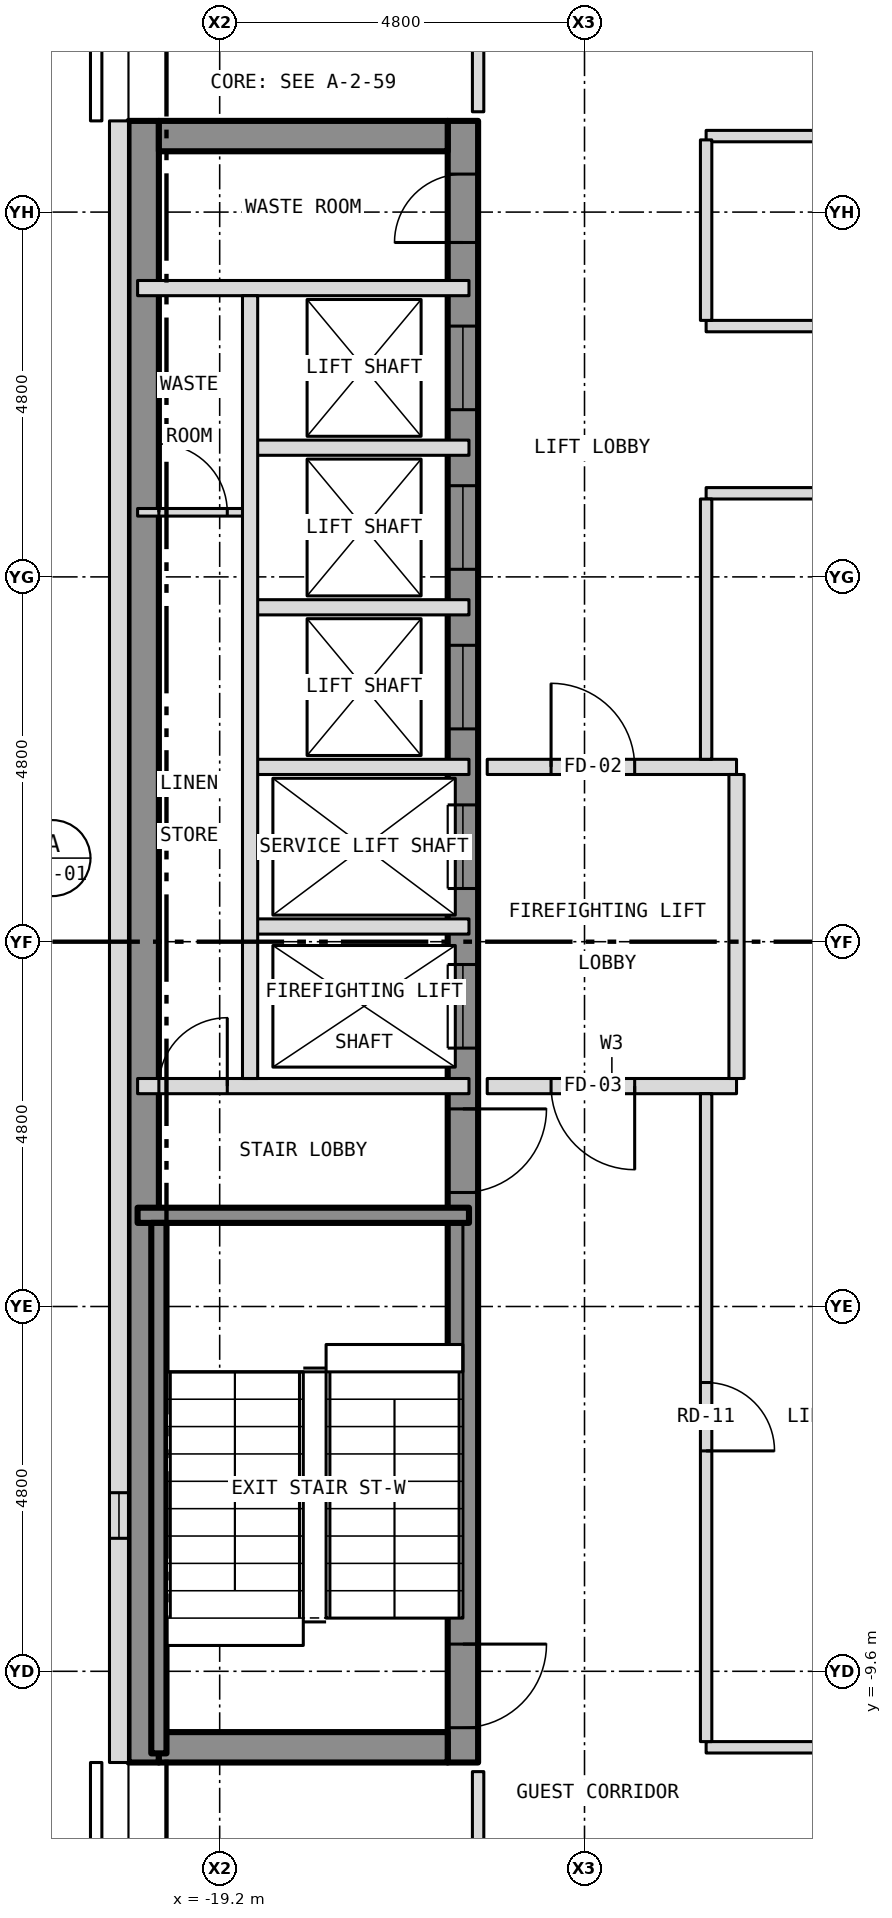
"""IFC4 building model, lengths in metres.
Left out: names, types, materials, properties, quantities, classifications, styles, units other than length and angle.
Written with IfcOpenShell. Run it as: python <this file> out.ifc"""

import sys

from ifc_helpers import new_model, si_unit, direction, frame, frame_2d, origin, place, context, subcontext, project, spatial, rectangle, extrude, element, fill, save


model = new_model("IFC4")
c1 = context("Model", 3, precision=1e-05, world=origin(), true_north=direction((0.0, 1.0)))
c2 = subcontext(c1, "Body", "Model", "MODEL_VIEW")
j1 = project(units=[si_unit("LENGTHUNIT", "METRE"), si_unit("PLANEANGLEUNIT", "RADIAN")], contexts=[c1])
p1 = place(None, origin())
s1 = spatial("IfcSite", under=j1, at=p1, CompositionType="ELEMENT")
p2 = place(p1, origin())
s2 = spatial("IfcBuilding", under=s1, at=p2, CompositionType="ELEMENT")
p3 = place(p2, frame((0.0, 0.0, 215.5)))
s3 = spatial("IfcBuildingStorey", under=s2, at=p3, CompositionType="ELEMENT", Elevation=215.5)
p4 = place(p3, frame((-16.0, -10.8, 0.0), z_axis=(0.0, 0.0, 1.0), x_axis=(0.0, 1.0, 0.0)))
e1 = element("IfcWall", 1, at=p4, inside=s3, PredefinedType="SHEAR", context=c2, shape_type="SweptSolid", body=[
    extrude(rectangle(XDim=21.6, YDim=0.4, at=frame_2d((10.8, 0.0))), origin(), (0.0, 0.0, 1.0), 3.25),
])
p5 = place(p4, frame((9.4, 0.0, 0.0)))
e2 = element("IfcOpeningElement", 2, at=p5, cuts=e1, PredefinedType="OPENING", context=c2, shape_type="SweptSolid", body=[
    extrude(rectangle(XDim=1.1, YDim=2.1, at=frame_2d((0.55, 1.05))), frame((0.0, 0.212, 0.0), z_axis=(0.0, -1.0, 0.0), x_axis=(1.0, 0.0, 0.0)), (0.0, 0.0, 1.0), 0.424),
])
p6 = place(p4, frame((11.5, 0.0, 0.0)))
e3 = element("IfcOpeningElement", 3, at=p6, cuts=e1, PredefinedType="OPENING", context=c2, shape_type="SweptSolid", body=[
    extrude(rectangle(XDim=1.1, YDim=2.1, at=frame_2d((0.55, 1.05))), frame((0.0, 0.212, 0.0), z_axis=(0.0, -1.0, 0.0), x_axis=(1.0, 0.0, 0.0)), (0.0, 0.0, 1.0), 0.424),
])
p7 = place(p4, frame((13.6, 0.0, 0.0)))
e4 = element("IfcOpeningElement", 4, at=p7, cuts=e1, PredefinedType="OPENING", context=c2, shape_type="SweptSolid", body=[
    extrude(rectangle(XDim=1.1, YDim=2.1, at=frame_2d((0.55, 1.05))), frame((0.0, 0.212, 0.0), z_axis=(0.0, -1.0, 0.0), x_axis=(1.0, 0.0, 0.0)), (0.0, 0.0, 1.0), 0.424),
])
p8 = place(p4, frame((15.7, 0.0, 0.0)))
e5 = element("IfcOpeningElement", 5, at=p8, cuts=e1, PredefinedType="OPENING", context=c2, shape_type="SweptSolid", body=[
    extrude(rectangle(XDim=1.1, YDim=2.1, at=frame_2d((0.55, 1.05))), frame((0.0, 0.212, 0.0), z_axis=(0.0, -1.0, 0.0), x_axis=(1.0, 0.0, 0.0)), (0.0, 0.0, 1.0), 0.424),
])
p9 = place(p4, frame((17.8, 0.0, 0.0)))
e6 = element("IfcOpeningElement", 6, at=p9, cuts=e1, PredefinedType="OPENING", context=c2, shape_type="SweptSolid", body=[
    extrude(rectangle(XDim=1.1, YDim=2.1, at=frame_2d((0.55, 1.05))), frame((0.0, 0.212, 0.0), z_axis=(0.0, -1.0, 0.0), x_axis=(1.0, 0.0, 0.0)), (0.0, 0.0, 1.0), 0.424),
])
p10 = place(p4, frame((0.458, 0.0, 0.0)))
e7 = element("IfcOpeningElement", 7, at=p10, cuts=e1, PredefinedType="OPENING", context=c2, shape_type="SweptSolid", body=[
    extrude(rectangle(XDim=1.1, YDim=2.1, at=frame_2d((0.55, 1.05))), frame((0.0, 0.212, 0.0), z_axis=(0.0, -1.0, 0.0), x_axis=(1.0, 0.0, 0.0)), (0.0, 0.0, 1.0), 0.424),
])
p11 = place(p4, frame((7.5, 0.0, 0.0)))
e8 = element("IfcOpeningElement", 8, at=p11, cuts=e1, PredefinedType="OPENING", context=c2, shape_type="SweptSolid", body=[
    extrude(rectangle(XDim=1.1, YDim=2.1, at=frame_2d((0.55, 1.05))), frame((0.0, 0.212, 0.0), z_axis=(0.0, -1.0, 0.0), x_axis=(1.0, 0.0, 0.0)), (0.0, 0.0, 1.0), 0.424),
])
p12 = place(p4, frame((20.0, 0.0, 0.0)))
e9 = element("IfcOpeningElement", 9, at=p12, cuts=e1, PredefinedType="OPENING", context=c2, shape_type="SweptSolid", body=[
    extrude(rectangle(XDim=0.9, YDim=2.1, at=frame_2d((0.45, 1.05))), frame((0.0, 0.212, 0.0), z_axis=(0.0, -1.0, 0.0), x_axis=(1.0, 0.0, 0.0)), (0.0, 0.0, 1.0), 0.424),
])
p13 = place(p3, frame((-20.2, -10.8, 0.0), z_axis=(0.0, 0.0, 1.0), x_axis=(0.0, 1.0, 0.0)))
e10 = element("IfcWall", 10, at=p13, inside=s3, PredefinedType="SHEAR", context=c2, shape_type="SweptSolid", body=[
    extrude(rectangle(XDim=21.6, YDim=0.4, at=frame_2d((10.8, 0.0))), origin(), (0.0, 0.0, 1.0), 3.25),
])
for number, where, z_axis, x_axis in (
    (11, (-20.0, 10.6, 0.0), (0.0, 0.0, 1.0), (1.0, 0.0, 0.0)),
    (12, (-20.0, -10.6, 0.0), (0.0, 0.0, 1.0), (1.0, 0.0, 0.0)),
):
    element("IfcWall", number, at=place(p3, frame(where, z_axis=z_axis, x_axis=x_axis)), inside=s3, PredefinedType="SHEAR", context=c2, shape_type="SweptSolid", body=[
        extrude(rectangle(XDim=3.8, YDim=0.4, at=frame_2d((1.9, 0.0))), origin(), (0.0, 0.0, 1.0), 3.25),
    ])
p14 = place(p3, frame((-20.525, 10.8, 0.0), z_axis=(0.0, 0.0, 1.0), x_axis=(0.0, -1.0, 0.0)))
e13 = element("IfcWall", 13, at=p14, inside=s3, PredefinedType="SOLIDWALL", context=c2, shape_type="SweptSolid", body=[
    extrude(rectangle(XDim=21.6, YDim=0.25, at=frame_2d((10.8, 0.0))), origin(), (0.0, 0.0, 1.0), 3.5),
])
p15 = place(p14, frame((18.05, 0.0, 1.0)))
e14 = element("IfcOpeningElement", 14, at=p15, cuts=e13, PredefinedType="OPENING", context=c2, shape_type="SweptSolid", body=[
    extrude(rectangle(XDim=0.6, YDim=1.5, at=frame_2d((0.3, 0.75))), frame((0.0, 0.137, 0.0), z_axis=(0.0, -1.0, 0.0), x_axis=(1.0, 0.0, 0.0)), (0.0, 0.0, 1.0), 0.274),
])
p16 = place(p3, frame((-12.8, -10.6, 0.0), z_axis=(0.0, 0.0, 1.0), x_axis=(1.0, 0.0, 0.0)))
e15 = element("IfcWall", 15, at=p16, inside=s3, PredefinedType="PARTITIONING", context=c2, shape_type="SweptSolid", body=[
    extrude(rectangle(XDim=13.9, YDim=0.15, at=frame_2d((6.95, 0.0))), origin(), (0.0, 0.0, 1.0), 3.35),
])
p17 = place(p3, frame((-20.28, -3.6, 0.0), z_axis=(0.0, 0.0, 1.0), x_axis=(1.0, 0.0, 0.0)))
e16 = element("IfcWall", 16, at=p17, inside=s3, PredefinedType="SHEAR", context=c2, shape_type="SweptSolid", body=[
    extrude(rectangle(XDim=4.36, YDim=0.2, at=frame_2d((2.18, 0.0))), origin(), (0.0, 0.0, 1.0), 3.25),
])
p18 = place(p3, frame((-20.28, -1.9, 0.0), z_axis=(0.0, 0.0, 1.0), x_axis=(1.0, 0.0, 0.0)))
e17 = element("IfcWall", 17, at=p18, inside=s3, PredefinedType="PARTITIONING", context=c2, shape_type="SweptSolid", body=[
    extrude(rectangle(XDim=4.36, YDim=0.2, at=frame_2d((2.18, 0.0))), origin(), (0.0, 0.0, 1.0), 3.25),
])
p19 = place(p18, frame((0.28, 0.0, 0.0)))
e18 = element("IfcOpeningElement", 18, at=p19, cuts=e17, PredefinedType="OPENING", context=c2, shape_type="SweptSolid", body=[
    extrude(rectangle(XDim=0.9, YDim=2.1, at=frame_2d((0.45, 1.05))), frame((0.0, 0.112, 0.0), z_axis=(0.0, -1.0, 0.0), x_axis=(1.0, 0.0, 0.0)), (0.0, 0.0, 1.0), 0.224),
])
p20 = place(p3, frame((-15.68, -1.9, 0.0), z_axis=(0.0, 0.0, 1.0), x_axis=(1.0, 0.0, 0.0)))
e19 = element("IfcWall", 19, at=p20, inside=s3, PredefinedType="PARTITIONING", context=c2, shape_type="SweptSolid", body=[
    extrude(rectangle(XDim=3.28, YDim=0.2, at=frame_2d((1.64, 0.0))), origin(), (0.0, 0.0, 1.0), 3.35),
])
p21 = place(p20, frame((0.84, 0.0, 0.0)))
e20 = element("IfcOpeningElement", 20, at=p21, cuts=e19, PredefinedType="OPENING", context=c2, shape_type="SweptSolid", body=[
    extrude(rectangle(XDim=1.1, YDim=2.1, at=frame_2d((0.55, 1.05))), frame((0.0, 0.112, 0.0), z_axis=(0.0, -1.0, 0.0), x_axis=(1.0, 0.0, 0.0)), (0.0, 0.0, 1.0), 0.224),
])
for number, where, z_axis, x_axis in (
    (21, (-18.8, 0.2, 0.0), (0.0, 0.0, 1.0), (1.0, 0.0, 0.0)),
    (22, (-18.8, 2.3, 0.0), (0.0, 0.0, 1.0), (1.0, 0.0, 0.0)),
):
    element("IfcWall", number, at=place(p3, frame(where, z_axis=z_axis, x_axis=x_axis)), inside=s3, PredefinedType="PARTITIONING", context=c2, shape_type="SweptSolid", body=[
        extrude(rectangle(XDim=2.88, YDim=0.2, at=frame_2d((1.44, 0.0))), origin(), (0.0, 0.0, 1.0), 3.25),
    ])
p22 = place(p3, frame((-15.68, 2.3, 0.0), z_axis=(0.0, 0.0, 1.0), x_axis=(1.0, 0.0, 0.0)))
e23 = element("IfcWall", 23, at=p22, inside=s3, PredefinedType="PARTITIONING", context=c2, shape_type="SweptSolid", body=[
    extrude(rectangle(XDim=3.28, YDim=0.2, at=frame_2d((1.64, 0.0))), origin(), (0.0, 0.0, 1.0), 3.35),
])
p23 = place(p22, frame((0.84, 0.0, 0.0)))
e24 = element("IfcOpeningElement", 24, at=p23, cuts=e23, PredefinedType="OPENING", context=c2, shape_type="SweptSolid", body=[
    extrude(rectangle(XDim=1.1, YDim=2.1, at=frame_2d((0.55, 1.05))), frame((0.0, 0.112, 0.0), z_axis=(0.0, -1.0, 0.0), x_axis=(1.0, 0.0, 0.0)), (0.0, 0.0, 1.0), 0.224),
])
p24 = place(p3, frame((-18.8, 4.4, 0.0), z_axis=(0.0, 0.0, 1.0), x_axis=(1.0, 0.0, 0.0)))
e25 = element("IfcWall", 25, at=p24, inside=s3, PredefinedType="PARTITIONING", context=c2, shape_type="SweptSolid", body=[
    extrude(rectangle(XDim=2.88, YDim=0.2, at=frame_2d((1.44, 0.0))), origin(), (0.0, 0.0, 1.0), 3.25),
])
p25 = place(p3, frame((-20.28, 5.65, 0.0), z_axis=(0.0, 0.0, 1.0), x_axis=(1.0, 0.0, 0.0)))
e26 = element("IfcWall", 26, at=p25, inside=s3, PredefinedType="PARTITIONING", context=c2, shape_type="SweptSolid", body=[
    extrude(rectangle(XDim=1.48, YDim=0.1, at=frame_2d((0.74, 0.0))), origin(), (0.0, 0.0, 1.0), 3.25),
])
p26 = place(p25, frame((0.28, 0.0, 0.0)))
e27 = element("IfcOpeningElement", 27, at=p26, cuts=e26, PredefinedType="OPENING", context=c2, shape_type="SweptSolid", body=[
    extrude(rectangle(XDim=0.9, YDim=2.1, at=frame_2d((0.45, 1.05))), frame((0.0, 0.062, 0.0), z_axis=(0.0, -1.0, 0.0), x_axis=(1.0, 0.0, 0.0)), (0.0, 0.0, 1.0), 0.124),
])
p27 = place(p3, frame((-12.8, 5.9, 0.0), z_axis=(0.0, 0.0, 1.0), x_axis=(1.0, 0.0, 0.0)))
e28 = element("IfcWall", 28, at=p27, inside=s3, PredefinedType="PARTITIONING", context=c2, shape_type="SweptSolid", body=[
    extrude(rectangle(XDim=13.9, YDim=0.15, at=frame_2d((6.95, 0.0))), origin(), (0.0, 0.0, 1.0), 3.35),
])
p28 = place(p3, frame((-18.8, 6.5, 0.0), z_axis=(0.0, 0.0, 1.0), x_axis=(1.0, 0.0, 0.0)))
e29 = element("IfcWall", 29, at=p28, inside=s3, PredefinedType="PARTITIONING", context=c2, shape_type="SweptSolid", body=[
    extrude(rectangle(XDim=2.88, YDim=0.2, at=frame_2d((1.44, 0.0))), origin(), (0.0, 0.0, 1.0), 3.25),
])
p29 = place(p3, frame((-12.8, 8.1, 0.0), z_axis=(0.0, 0.0, 1.0), x_axis=(1.0, 0.0, 0.0)))
e30 = element("IfcWall", 30, at=p29, inside=s3, PredefinedType="PARTITIONING", context=c2, shape_type="SweptSolid", body=[
    extrude(rectangle(XDim=13.9, YDim=0.15, at=frame_2d((6.95, 0.0))), origin(), (0.0, 0.0, 1.0), 3.35),
])
p30 = place(p3, frame((-20.28, 8.6, 0.0), z_axis=(0.0, 0.0, 1.0), x_axis=(1.0, 0.0, 0.0)))
e31 = element("IfcWall", 31, at=p30, inside=s3, PredefinedType="PARTITIONING", context=c2, shape_type="SweptSolid", body=[
    extrude(rectangle(XDim=4.36, YDim=0.2, at=frame_2d((2.18, 0.0))), origin(), (0.0, 0.0, 1.0), 3.25),
])
p31 = place(p3, frame((-12.8, 10.6, 0.0), z_axis=(0.0, 0.0, 1.0), x_axis=(1.0, 0.0, 0.0)))
e32 = element("IfcWall", 32, at=p31, inside=s3, PredefinedType="PARTITIONING", context=c2, shape_type="SweptSolid", body=[
    extrude(rectangle(XDim=13.9, YDim=0.15, at=frame_2d((6.95, 0.0))), origin(), (0.0, 0.0, 1.0), 3.35),
])
p32 = place(p31, frame((8.1, 0.0, 0.0)))
e33 = element("IfcOpeningElement", 33, at=p32, cuts=e32, PredefinedType="OPENING", context=c2, shape_type="SweptSolid", body=[
    extrude(rectangle(XDim=0.9, YDim=2.1, at=frame_2d((0.45, 1.05))), frame((0.0, 0.087, 0.0), z_axis=(0.0, -1.0, 0.0), x_axis=(1.0, 0.0, 0.0)), (0.0, 0.0, 1.0), 0.174),
])
p33 = place(p3, frame((-20.0, -10.68, 0.0), z_axis=(0.0, 0.0, 1.0), x_axis=(0.0, 1.0, 0.0)))
e34 = element("IfcWall", 34, at=p33, inside=s3, PredefinedType="SHEAR", context=c2, shape_type="SweptSolid", body=[
    extrude(rectangle(XDim=6.98, YDim=0.2, at=frame_2d((3.49, 0.0))), origin(), (0.0, 0.0, 1.0), 3.25),
])
p34 = place(p3, frame((-18.8, -1.8, 0.0), z_axis=(0.0, 0.0, 1.0), x_axis=(0.0, 1.0, 0.0)))
e35 = element("IfcWall", 35, at=p34, inside=s3, PredefinedType="PARTITIONING", context=c2, shape_type="SweptSolid", body=[
    extrude(rectangle(XDim=10.3, YDim=0.2, at=frame_2d((5.15, 0.0))), origin(), (0.0, 0.0, 1.0), 3.25),
])
for number, where, z_axis, x_axis in (
    (36, (-15.8, -12.725, 0.0), (0.0, 0.0, 1.0), (0.0, 1.0, 0.0)),
    (37, (-15.8, 10.92, 0.0), (0.0, 0.0, 1.0), (0.0, 1.0, 0.0)),
):
    element("IfcWall", number, at=place(p3, frame(where, z_axis=z_axis, x_axis=x_axis)), inside=s3, PredefinedType="PARTITIONING", context=c2, shape_type="SweptSolid", body=[
        extrude(rectangle(XDim=1.805, YDim=0.15, at=frame_2d((0.903, 0.0))), origin(), (0.0, 0.0, 1.0), 3.35),
    ])
p35 = place(p3, frame((-12.8, -10.525, 0.0), z_axis=(0.0, 0.0, 1.0), x_axis=(0.0, 1.0, 0.0)))
e38 = element("IfcWall", 38, at=p35, inside=s3, PredefinedType="PARTITIONING", context=c2, shape_type="SweptSolid", body=[
    extrude(rectangle(XDim=8.525, YDim=0.15, at=frame_2d((4.262, 0.0))), origin(), (0.0, 0.0, 1.0), 3.35),
])
p36 = place(p35, frame((3.825, 0.0, 0.0)))
e39 = element("IfcOpeningElement", 39, at=p36, cuts=e38, PredefinedType="OPENING", context=c2, shape_type="SweptSolid", body=[
    extrude(rectangle(XDim=0.9, YDim=2.1, at=frame_2d((0.45, 1.05))), frame((0.0, 0.087, 0.0), z_axis=(0.0, -1.0, 0.0), x_axis=(1.0, 0.0, 0.0)), (0.0, 0.0, 1.0), 0.174),
])
p37 = place(p3, frame((-12.8, 2.4, 0.0), z_axis=(0.0, 0.0, 1.0), x_axis=(0.0, 1.0, 0.0)))
e40 = element("IfcWall", 40, at=p37, inside=s3, PredefinedType="PARTITIONING", context=c2, shape_type="SweptSolid", body=[
    extrude(rectangle(XDim=3.425, YDim=0.15, at=frame_2d((1.712, 0.0))), origin(), (0.0, 0.0, 1.0), 3.35),
])
p38 = place(p3, frame((-12.8, 8.175, 0.0), z_axis=(0.0, 0.0, 1.0), x_axis=(0.0, 1.0, 0.0)))
e41 = element("IfcWall", 41, at=p38, inside=s3, PredefinedType="PARTITIONING", context=c2, shape_type="SweptSolid", body=[
    extrude(rectangle(XDim=2.375, YDim=0.15, at=frame_2d((1.188, 0.0))), origin(), (0.0, 0.0, 1.0), 3.35),
])
p39 = place(p3, frame((-12.4, -1.8, 0.0), z_axis=(0.0, 0.0, 1.0), x_axis=(0.0, 1.0, 0.0)))
e42 = element("IfcWall", 42, at=p39, inside=s3, PredefinedType="PARTITIONING", context=c2, shape_type="SweptSolid", body=[
    extrude(rectangle(XDim=4.0, YDim=0.2, at=frame_2d((2.0, 0.0))), origin(), (0.0, 0.0, 1.0), 3.35),
])
p40 = place(p15, origin())
e43 = element("IfcWindow", 43, at=p40, inside=s3, PartitioningType="SINGLE_PANEL", PredefinedType="WINDOW", context=c2, shape_type="SweptSolid", body=[
    extrude(rectangle(XDim=0.6, YDim=1.5, at=frame_2d((0.3, 0.75))), frame((0.0, -0.035, 0.0), z_axis=(0.0, -1.0, 0.0), x_axis=(1.0, 0.0, 0.0)), (0.0, 0.0, 1.0), 0.06),
])
fill(e14, e43)
p41 = place(p5, origin())
e44 = element("IfcDoor", 44, at=p41, inside=s3, OperationType="SLIDING_TO_LEFT", PredefinedType="DOOR", context=c2, shape_type="SweptSolid", body=[
    extrude(rectangle(XDim=1.1, YDim=2.1, at=frame_2d((0.55, 1.05))), frame((0.0, 0.025, 0.0), z_axis=(0.0, -1.0, 0.0), x_axis=(1.0, 0.0, 0.0)), (0.0, 0.0, 1.0), 0.05),
])
fill(e2, e44)
p42 = place(p6, origin())
e45 = element("IfcDoor", 45, at=p42, inside=s3, OperationType="SLIDING_TO_LEFT", PredefinedType="DOOR", context=c2, shape_type="SweptSolid", body=[
    extrude(rectangle(XDim=1.1, YDim=2.1, at=frame_2d((0.55, 1.05))), frame((0.0, 0.025, 0.0), z_axis=(0.0, -1.0, 0.0), x_axis=(1.0, 0.0, 0.0)), (0.0, 0.0, 1.0), 0.05),
])
fill(e3, e45)
p43 = place(p7, origin())
e46 = element("IfcDoor", 46, at=p43, inside=s3, OperationType="SLIDING_TO_LEFT", PredefinedType="DOOR", context=c2, shape_type="SweptSolid", body=[
    extrude(rectangle(XDim=1.1, YDim=2.1, at=frame_2d((0.55, 1.05))), frame((0.0, 0.025, 0.0), z_axis=(0.0, -1.0, 0.0), x_axis=(1.0, 0.0, 0.0)), (0.0, 0.0, 1.0), 0.05),
])
fill(e4, e46)
p44 = place(p8, origin())
e47 = element("IfcDoor", 47, at=p44, inside=s3, OperationType="SLIDING_TO_LEFT", PredefinedType="DOOR", context=c2, shape_type="SweptSolid", body=[
    extrude(rectangle(XDim=1.1, YDim=2.1, at=frame_2d((0.55, 1.05))), frame((0.0, 0.025, 0.0), z_axis=(0.0, -1.0, 0.0), x_axis=(1.0, 0.0, 0.0)), (0.0, 0.0, 1.0), 0.05),
])
fill(e5, e47)
p45 = place(p9, origin())
e48 = element("IfcDoor", 48, at=p45, inside=s3, OperationType="SLIDING_TO_LEFT", PredefinedType="DOOR", context=c2, shape_type="SweptSolid", body=[
    extrude(rectangle(XDim=1.1, YDim=2.1, at=frame_2d((0.55, 1.05))), frame((0.0, 0.025, 0.0), z_axis=(0.0, -1.0, 0.0), x_axis=(1.0, 0.0, 0.0)), (0.0, 0.0, 1.0), 0.05),
])
fill(e6, e48)
p46 = place(p10, origin())
e49 = element("IfcDoor", 49, at=p46, inside=s3, OperationType="SINGLE_SWING_RIGHT", PredefinedType="DOOR", context=c2, shape_type="SweptSolid", body=[
    extrude(rectangle(XDim=1.1, YDim=2.1, at=frame_2d((0.55, 1.05))), frame((0.0, 0.025, 0.0), z_axis=(0.0, -1.0, 0.0), x_axis=(1.0, 0.0, 0.0)), (0.0, 0.0, 1.0), 0.05),
])
fill(e7, e49)
p47 = place(p11, origin())
e50 = element("IfcDoor", 50, at=p47, inside=s3, OperationType="SINGLE_SWING_RIGHT", PredefinedType="DOOR", context=c2, shape_type="SweptSolid", body=[
    extrude(rectangle(XDim=1.1, YDim=2.1, at=frame_2d((0.55, 1.05))), frame((0.0, 0.025, 0.0), z_axis=(0.0, -1.0, 0.0), x_axis=(1.0, 0.0, 0.0)), (0.0, 0.0, 1.0), 0.05),
])
fill(e8, e50)
p48 = place(p12, origin())
e51 = element("IfcDoor", 51, at=p48, inside=s3, OperationType="SINGLE_SWING_LEFT", PredefinedType="DOOR", context=c2, shape_type="SweptSolid", body=[
    extrude(rectangle(XDim=0.9, YDim=2.1, at=frame_2d((0.45, 1.05))), frame((0.0, 0.025, 0.0), z_axis=(0.0, -1.0, 0.0), x_axis=(1.0, 0.0, 0.0)), (0.0, 0.0, 1.0), 0.05),
])
fill(e9, e51)
p49 = place(p19, origin())
e52 = element("IfcDoor", 52, at=p49, inside=s3, OperationType="SINGLE_SWING_RIGHT", PredefinedType="DOOR", context=c2, shape_type="SweptSolid", body=[
    extrude(rectangle(XDim=0.9, YDim=2.1, at=frame_2d((0.45, 1.05))), frame((0.0, 0.025, 0.0), z_axis=(0.0, -1.0, 0.0), x_axis=(1.0, 0.0, 0.0)), (0.0, 0.0, 1.0), 0.05),
])
fill(e18, e52)
p50 = place(p26, origin())
e53 = element("IfcDoor", 53, at=p50, inside=s3, OperationType="SINGLE_SWING_LEFT", PredefinedType="DOOR", context=c2, shape_type="SweptSolid", body=[
    extrude(rectangle(XDim=0.9, YDim=2.1, at=frame_2d((0.45, 1.05))), frame((0.0, 0.025, 0.0), z_axis=(0.0, -1.0, 0.0), x_axis=(1.0, 0.0, 0.0)), (0.0, 0.0, 1.0), 0.05),
])
fill(e27, e53)
p51 = place(p23, origin())
e54 = element("IfcDoor", 54, at=p51, inside=s3, OperationType="SINGLE_SWING_LEFT", PredefinedType="DOOR", context=c2, shape_type="SweptSolid", body=[
    extrude(rectangle(XDim=1.1, YDim=2.1, at=frame_2d((0.55, 1.05))), frame((0.0, 0.025, 0.0), z_axis=(0.0, -1.0, 0.0), x_axis=(1.0, 0.0, 0.0)), (0.0, 0.0, 1.0), 0.05),
])
fill(e24, e54)
p52 = place(p21, origin())
e55 = element("IfcDoor", 55, at=p52, inside=s3, OperationType="SINGLE_SWING_RIGHT", PredefinedType="DOOR", context=c2, shape_type="SweptSolid", body=[
    extrude(rectangle(XDim=1.1, YDim=2.1, at=frame_2d((0.55, 1.05))), frame((0.0, 0.025, 0.0), z_axis=(0.0, -1.0, 0.0), x_axis=(1.0, 0.0, 0.0)), (0.0, 0.0, 1.0), 0.05),
])
fill(e20, e55)
p53 = place(p36, origin())
e56 = element("IfcDoor", 56, at=p53, inside=s3, OperationType="SINGLE_SWING_LEFT", PredefinedType="DOOR", context=c2, shape_type="SweptSolid", body=[
    extrude(rectangle(XDim=0.9, YDim=2.1, at=frame_2d((0.45, 1.05))), frame((0.0, 0.025, 0.0), z_axis=(0.0, -1.0, 0.0), x_axis=(1.0, 0.0, 0.0)), (0.0, 0.0, 1.0), 0.05),
])
fill(e39, e56)
save(model, sys.argv[1])
